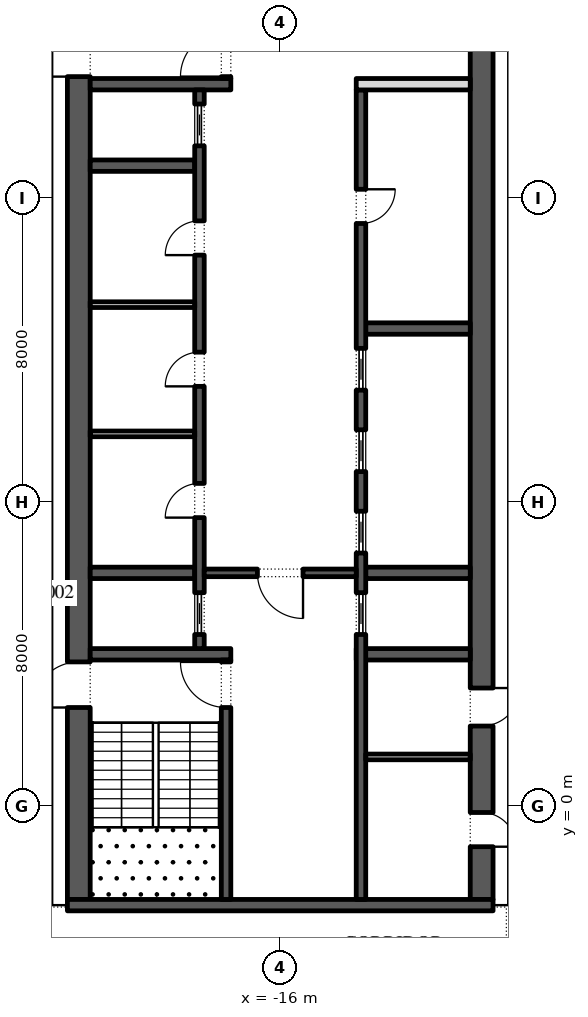
"""IFC4 building model, lengths in metres.
Left out: names, types, materials, properties, quantities, classifications, styles, units other than length and angle.
Written with IfcOpenShell. Run it as: python <this file> out.ifc"""

import sys

from ifc_helpers import new_model, si_unit, direction, frame, frame_2d, origin, place, context, subcontext, project, spatial, rectangle, extrude, element, fill, save


model = new_model("IFC4")
c1 = context("Model", 3, precision=1e-05, world=origin(), true_north=direction((0.0, 1.0)))
c2 = subcontext(c1, "Body", "Model", "MODEL_VIEW")
j1 = project(units=[si_unit("LENGTHUNIT", "METRE"), si_unit("PLANEANGLEUNIT", "RADIAN")], contexts=[c1])
p1 = place(None, origin())
s1 = spatial("IfcSite", under=j1, at=p1, CompositionType="ELEMENT")
p2 = place(p1, origin())
s2 = spatial("IfcBuilding", under=s1, at=p2, CompositionType="ELEMENT")
p3 = place(p2, frame((0.0, 0.0, 251.4)))
s3 = spatial("IfcBuildingStorey", under=s2, at=p3, CompositionType="ELEMENT", Elevation=251.4)
p4 = place(p3, frame((-21.359, 48.678, 0.0), z_axis=(0.0, 0.0, 1.0), x_axis=(-0.224949198343, -0.974370493275, 0.0)))
e1 = element("IfcWall", 1, at=p4, inside=s3, PredefinedType="STANDARD", context=c2, shape_type="SweptSolid", body=[
    extrude(rectangle(XDim=49.5, YDim=0.3, at=frame_2d((24.75, 0.0))), origin(), (0.0, 0.0, 1.0), 4.0),
])
p5 = place(p4, frame((1.157, 0.0, 0.45)))
e2 = element("IfcOpeningElement", 2, at=p5, cuts=e1, PredefinedType="OPENING", context=c2, shape_type="SweptSolid", body=[
    extrude(rectangle(XDim=4.5, YDim=3.05, at=frame_2d((2.25, 1.525))), frame((0.0, 0.16, 0.0), z_axis=(0.0, -1.0, 0.0), x_axis=(1.0, 0.0, 0.0)), (0.0, 0.0, 1.0), 0.32),
])
p6 = place(p4, frame((9.171, 0.0, 0.0)))
e3 = element("IfcOpeningElement", 3, at=p6, cuts=e1, PredefinedType="OPENING", context=c2, shape_type="SweptSolid", body=[
    extrude(rectangle(XDim=2.4, YDim=3.5, at=frame_2d((1.2, 1.75))), frame((0.0, 0.16, 0.0), z_axis=(0.0, -1.0, 0.0), x_axis=(1.0, 0.0, 0.0)), (0.0, 0.0, 1.0), 0.32),
])
p7 = place(p4, frame((15.236, 0.0, 0.45)))
e4 = element("IfcOpeningElement", 4, at=p7, cuts=e1, PredefinedType="OPENING", context=c2, shape_type="SweptSolid", body=[
    extrude(rectangle(XDim=4.5, YDim=3.05, at=frame_2d((2.25, 1.525))), frame((0.0, 0.16, 0.0), z_axis=(0.0, -1.0, 0.0), x_axis=(1.0, 0.0, 0.0)), (0.0, 0.0, 1.0), 0.32),
])
p8 = place(p4, frame((22.35, 0.0, 0.45)))
e5 = element("IfcOpeningElement", 5, at=p8, cuts=e1, PredefinedType="OPENING", context=c2, shape_type="SweptSolid", body=[
    extrude(rectangle(XDim=4.5, YDim=3.05, at=frame_2d((2.25, 1.525))), frame((0.0, 0.16, 0.0), z_axis=(0.0, -1.0, 0.0), x_axis=(1.0, 0.0, 0.0)), (0.0, 0.0, 1.0), 0.32),
])
p9 = place(p4, frame((29.464, 0.0, 0.45)))
e6 = element("IfcOpeningElement", 6, at=p9, cuts=e1, PredefinedType="OPENING", context=c2, shape_type="SweptSolid", body=[
    extrude(rectangle(XDim=4.5, YDim=3.05, at=frame_2d((2.25, 1.525))), frame((0.0, 0.16, 0.0), z_axis=(0.0, -1.0, 0.0), x_axis=(1.0, 0.0, 0.0)), (0.0, 0.0, 1.0), 0.32),
])
p10 = place(p4, frame((37.628, 0.0, 0.0)))
e7 = element("IfcOpeningElement", 7, at=p10, cuts=e1, PredefinedType="OPENING", context=c2, shape_type="SweptSolid", body=[
    extrude(rectangle(XDim=2.4, YDim=3.325, at=frame_2d((1.2, 1.663))), frame((0.0, 0.16, 0.0), z_axis=(0.0, -1.0, 0.0), x_axis=(1.0, 0.0, 0.0)), (0.0, 0.0, 1.0), 0.32),
])
p11 = place(p4, frame((43.693, 0.0, 0.45)))
e8 = element("IfcOpeningElement", 8, at=p11, cuts=e1, PredefinedType="OPENING", context=c2, shape_type="SweptSolid", body=[
    extrude(rectangle(XDim=4.5, YDim=2.825, at=frame_2d((2.25, 1.413))), frame((0.0, 0.16, 0.0), z_axis=(0.0, -1.0, 0.0), x_axis=(1.0, 0.0, 0.0)), (0.0, 0.0, 1.0), 0.32),
])
p12 = place(p3, frame((-21.3, -2.45, 0.0), z_axis=(0.0, 0.0, 1.0), x_axis=(0.0, 1.0, 0.0)))
e9 = element("IfcWall", 9, at=p12, inside=s3, PredefinedType="SHEAR", context=c2, shape_type="SweptSolid", body=[
    extrude(rectangle(XDim=27.9, YDim=0.6, at=frame_2d((13.95, 0.0))), origin(), (0.0, 0.0, 1.0), 4.0),
])
p13 = place(p12, frame((5.05, 0.0, 0.0)))
e10 = element("IfcOpeningElement", 10, at=p13, cuts=e9, PredefinedType="OPENING", context=c2, shape_type="SweptSolid", body=[
    extrude(rectangle(XDim=1.2, YDim=2.1, at=frame_2d((0.6, 1.05))), frame((0.0, 0.31, 0.0), z_axis=(0.0, -1.0, 0.0), x_axis=(1.0, 0.0, 0.0)), (0.0, 0.0, 1.0), 0.62),
])
p14 = place(p12, frame((21.65, 0.0, 0.0)))
e11 = element("IfcOpeningElement", 11, at=p14, cuts=e9, PredefinedType="OPENING", context=c2, shape_type="SweptSolid", body=[
    extrude(rectangle(XDim=1.2, YDim=2.1, at=frame_2d((0.6, 1.05))), frame((0.0, 0.31, 0.0), z_axis=(0.0, -1.0, 0.0), x_axis=(1.0, 0.0, 0.0)), (0.0, 0.0, 1.0), 0.62),
])
p15 = place(p3, frame((-10.7, -2.45, 0.0), z_axis=(0.0, 0.0, 1.0), x_axis=(0.0, 1.0, 0.0)))
e12 = element("IfcWall", 12, at=p15, inside=s3, PredefinedType="SHEAR", context=c2, shape_type="SweptSolid", body=[
    extrude(rectangle(XDim=27.9, YDim=0.6, at=frame_2d((13.95, 0.0))), origin(), (0.0, 0.0, 1.0), 4.0),
])
p16 = place(p15, frame((23.65, 0.0, 0.0)))
e13 = element("IfcOpeningElement", 13, at=p16, cuts=e12, PredefinedType="OPENING", context=c2, shape_type="SweptSolid", body=[
    extrude(rectangle(XDim=2.4, YDim=2.1, at=frame_2d((1.2, 1.05))), frame((0.0, 0.31, 0.0), z_axis=(0.0, -1.0, 0.0), x_axis=(1.0, 0.0, 0.0)), (0.0, 0.0, 1.0), 0.62),
])
p17 = place(p15, frame((1.387, 0.0, 0.0)))
e14 = element("IfcOpeningElement", 14, at=p17, cuts=e12, PredefinedType="OPENING", context=c2, shape_type="SweptSolid", body=[
    extrude(rectangle(XDim=0.9, YDim=2.1, at=frame_2d((0.45, 1.05))), frame((0.0, 0.31, 0.0), z_axis=(0.0, -1.0, 0.0), x_axis=(1.0, 0.0, 0.0)), (0.0, 0.0, 1.0), 0.62),
])
p18 = place(p15, frame((4.562, 0.0, 0.0)))
e15 = element("IfcOpeningElement", 15, at=p18, cuts=e12, PredefinedType="OPENING", context=c2, shape_type="SweptSolid", body=[
    extrude(rectangle(XDim=1.0, YDim=2.1, at=frame_2d((0.5, 1.05))), frame((0.0, 0.31, 0.0), z_axis=(0.0, -1.0, 0.0), x_axis=(1.0, 0.0, 0.0)), (0.0, 0.0, 1.0), 0.62),
])
p19 = place(p3, frame((-21.6, -2.6, 0.0), z_axis=(0.0, 0.0, 1.0), x_axis=(1.0, 0.0, 0.0)))
e16 = element("IfcWall", 16, at=p19, inside=s3, PredefinedType="SHEAR", context=c2, shape_type="SweptSolid", body=[
    extrude(rectangle(XDim=11.2, YDim=0.3, at=frame_2d((5.6, 0.0))), origin(), (0.0, 0.0, 1.0), 4.0),
])
p20 = place(p3, frame((-21.0, 4.0, 0.0), z_axis=(0.0, 0.0, 1.0), x_axis=(1.0, 0.0, 0.0)))
e17 = element("IfcWall", 17, at=p20, inside=s3, PredefinedType="SHEAR", context=c2, shape_type="SweptSolid", body=[
    extrude(rectangle(XDim=3.7, YDim=0.3, at=frame_2d((1.85, 0.0))), origin(), (0.0, 0.0, 1.0), 4.0),
])
p21 = place(p3, frame((-17.425, -2.45, 0.0), z_axis=(0.0, 0.0, 1.0), x_axis=(0.0, 1.0, 0.0)))
e18 = element("IfcWall", 18, at=p21, inside=s3, PredefinedType="SHEAR", context=c2, shape_type="SweptSolid", body=[
    extrude(rectangle(XDim=6.3, YDim=0.25, at=frame_2d((3.15, 0.0))), origin(), (0.0, 0.0, 1.0), 4.0),
])
p22 = place(p21, frame((5.05, 0.0, 0.0)))
e19 = element("IfcOpeningElement", 19, at=p22, cuts=e18, PredefinedType="OPENING", context=c2, shape_type="SweptSolid", body=[
    extrude(rectangle(XDim=1.2, YDim=2.1, at=frame_2d((0.6, 1.05))), frame((0.0, 0.135, 0.0), z_axis=(0.0, -1.0, 0.0), x_axis=(1.0, 0.0, 0.0)), (0.0, 0.0, 1.0), 0.27),
])
p23 = place(p3, frame((-21.0, 19.0, 0.0), z_axis=(0.0, 0.0, 1.0), x_axis=(1.0, 0.0, 0.0)))
e20 = element("IfcWall", 20, at=p23, inside=s3, PredefinedType="SHEAR", context=c2, shape_type="SweptSolid", body=[
    extrude(rectangle(XDim=3.7, YDim=0.3, at=frame_2d((1.85, 0.0))), origin(), (0.0, 0.0, 1.0), 4.0),
])
p24 = place(p3, frame((-17.425, 19.15, 0.0), z_axis=(0.0, 0.0, 1.0), x_axis=(0.0, 1.0, 0.0)))
e21 = element("IfcWall", 21, at=p24, inside=s3, PredefinedType="SHEAR", context=c2, shape_type="SweptSolid", body=[
    extrude(rectangle(XDim=6.3, YDim=0.25, at=frame_2d((3.15, 0.0))), origin(), (0.0, 0.0, 1.0), 4.0),
])
p25 = place(p24, frame((0.05, 0.0, 0.0)))
e22 = element("IfcOpeningElement", 22, at=p25, cuts=e21, PredefinedType="OPENING", context=c2, shape_type="SweptSolid", body=[
    extrude(rectangle(XDim=1.2, YDim=2.1, at=frame_2d((0.6, 1.05))), frame((0.0, 0.135, 0.0), z_axis=(0.0, -1.0, 0.0), x_axis=(1.0, 0.0, 0.0)), (0.0, 0.0, 1.0), 0.27),
])
for number, where, z_axis, x_axis in (
    (23, (-21.0, 6.143, 0.0), (0.0, 0.0, 1.0), (1.0, 0.0, 0.0)),
    (24, (-21.0, 16.857, 0.0), (0.0, 0.0, 1.0), (1.0, 0.0, 0.0)),
):
    element("IfcWall", number, at=place(p3, frame(where, z_axis=z_axis, x_axis=x_axis)), inside=s3, PredefinedType="SHEAR", context=c2, shape_type="SweptSolid", body=[
        extrude(rectangle(XDim=2.75, YDim=0.3, at=frame_2d((1.375, 0.0))), origin(), (0.0, 0.0, 1.0), 4.0),
    ])
p26 = place(p3, frame((-18.125, 4.15, 0.0), z_axis=(0.0, 0.0, 1.0), x_axis=(0.0, 1.0, 0.0)))
e25 = element("IfcWall", 25, at=p26, inside=s3, PredefinedType="SHEAR", context=c2, shape_type="SweptSolid", body=[
    extrude(rectangle(XDim=14.7, YDim=0.25, at=frame_2d((7.35, 0.0))), origin(), (0.0, 0.0, 1.0), 4.0),
])
p27 = place(p26, frame((3.446, 0.0, 0.0)))
e26 = element("IfcOpeningElement", 26, at=p27, cuts=e25, PredefinedType="OPENING", context=c2, shape_type="SweptSolid", body=[
    extrude(rectangle(XDim=0.9, YDim=2.1, at=frame_2d((0.45, 1.05))), frame((0.0, 0.135, 0.0), z_axis=(0.0, -1.0, 0.0), x_axis=(1.0, 0.0, 0.0)), (0.0, 0.0, 1.0), 0.27),
])
p28 = place(p26, frame((6.9, 0.0, 0.0)))
e27 = element("IfcOpeningElement", 27, at=p28, cuts=e25, PredefinedType="OPENING", context=c2, shape_type="SweptSolid", body=[
    extrude(rectangle(XDim=0.9, YDim=2.1, at=frame_2d((0.45, 1.05))), frame((0.0, 0.135, 0.0), z_axis=(0.0, -1.0, 0.0), x_axis=(1.0, 0.0, 0.0)), (0.0, 0.0, 1.0), 0.27),
])
p29 = place(p26, frame((10.354, 0.0, 0.0)))
e28 = element("IfcOpeningElement", 28, at=p29, cuts=e25, PredefinedType="OPENING", context=c2, shape_type="SweptSolid", body=[
    extrude(rectangle(XDim=0.9, YDim=2.1, at=frame_2d((0.45, 1.05))), frame((0.0, 0.135, 0.0), z_axis=(0.0, -1.0, 0.0), x_axis=(1.0, 0.0, 0.0)), (0.0, 0.0, 1.0), 0.27),
])
p30 = place(p26, frame((0.371, 0.0, 0.0)))
e29 = element("IfcOpeningElement", 29, at=p30, cuts=e25, PredefinedType="OPENING", context=c2, shape_type="SweptSolid", body=[
    extrude(rectangle(XDim=1.1, YDim=2.1, at=frame_2d((0.55, 1.05))), frame((0.0, 0.135, 0.0), z_axis=(0.0, -1.0, 0.0), x_axis=(1.0, 0.0, 0.0)), (0.0, 0.0, 1.0), 0.27),
])
p31 = place(p26, frame((13.229, 0.0, 0.0)))
e30 = element("IfcOpeningElement", 30, at=p31, cuts=e25, PredefinedType="OPENING", context=c2, shape_type="SweptSolid", body=[
    extrude(rectangle(XDim=1.1, YDim=2.1, at=frame_2d((0.55, 1.05))), frame((0.0, 0.135, 0.0), z_axis=(0.0, -1.0, 0.0), x_axis=(1.0, 0.0, 0.0)), (0.0, 0.0, 1.0), 0.27),
])
for number, where, z_axis, x_axis in (
    (31, (-21.0, 9.8, 0.0), (0.0, 0.0, 1.0), (1.0, 0.0, 0.0)),
    (32, (-21.0, 13.2, 0.0), (0.0, 0.0, 1.0), (1.0, 0.0, 0.0)),
):
    element("IfcWall", number, at=place(p3, frame(where, z_axis=z_axis, x_axis=x_axis)), inside=s3, PredefinedType="PARTITIONING", context=c2, shape_type="SweptSolid", body=[
        extrude(rectangle(XDim=2.75, YDim=0.15, at=frame_2d((1.375, 0.0))), origin(), (0.0, 0.0, 1.0), 4.0),
    ])
p32 = place(p3, frame((-14.0, 4.0, 0.0), z_axis=(0.0, 0.0, 1.0), x_axis=(1.0, 0.0, 0.0)))
e33 = element("IfcWall", 33, at=p32, inside=s3, PredefinedType="SHEAR", context=c2, shape_type="SweptSolid", body=[
    extrude(rectangle(XDim=3.0, YDim=0.3, at=frame_2d((1.5, 0.0))), origin(), (0.0, 0.0, 1.0), 4.0),
])
for number, where, z_axis, x_axis in (
    (34, (-13.75, 6.143, 0.0), (0.0, 0.0, 1.0), (1.0, 0.0, 0.0)),
    (35, (-13.75, 12.571, 0.0), (0.0, 0.0, 1.0), (1.0, 0.0, 0.0)),
):
    element("IfcWall", number, at=place(p3, frame(where, z_axis=z_axis, x_axis=x_axis)), inside=s3, PredefinedType="SHEAR", context=c2, shape_type="SweptSolid", body=[
        extrude(rectangle(XDim=2.75, YDim=0.3, at=frame_2d((1.375, 0.0))), origin(), (0.0, 0.0, 1.0), 4.0),
    ])
p33 = place(p3, frame((-13.875, -2.45, 0.0), z_axis=(0.0, 0.0, 1.0), x_axis=(0.0, 1.0, 0.0)))
e36 = element("IfcWall", 36, at=p33, inside=s3, PredefinedType="SHEAR", context=c2, shape_type="SweptSolid", body=[
    extrude(rectangle(XDim=21.3, YDim=0.25, at=frame_2d((10.65, 0.0))), origin(), (0.0, 0.0, 1.0), 4.0),
])
p34 = place(p33, frame((17.786, 0.0, 0.0)))
e37 = element("IfcOpeningElement", 37, at=p34, cuts=e36, PredefinedType="OPENING", context=c2, shape_type="SweptSolid", body=[
    extrude(rectangle(XDim=0.9, YDim=2.1, at=frame_2d((0.45, 1.05))), frame((0.0, 0.135, 0.0), z_axis=(0.0, -1.0, 0.0), x_axis=(1.0, 0.0, 0.0)), (0.0, 0.0, 1.0), 0.27),
])
p35 = place(p33, frame((6.971, 0.0, 0.0)))
e38 = element("IfcOpeningElement", 38, at=p35, cuts=e36, PredefinedType="OPENING", context=c2, shape_type="SweptSolid", body=[
    extrude(rectangle(XDim=1.1, YDim=2.1, at=frame_2d((0.55, 1.05))), frame((0.0, 0.135, 0.0), z_axis=(0.0, -1.0, 0.0), x_axis=(1.0, 0.0, 0.0)), (0.0, 0.0, 1.0), 0.27),
])
p36 = place(p33, frame((9.114, 0.0, 0.0)))
e39 = element("IfcOpeningElement", 39, at=p36, cuts=e36, PredefinedType="OPENING", context=c2, shape_type="SweptSolid", body=[
    extrude(rectangle(XDim=1.1, YDim=2.1, at=frame_2d((0.55, 1.05))), frame((0.0, 0.135, 0.0), z_axis=(0.0, -1.0, 0.0), x_axis=(1.0, 0.0, 0.0)), (0.0, 0.0, 1.0), 0.27),
])
p37 = place(p33, frame((11.257, 0.0, 0.0)))
e40 = element("IfcOpeningElement", 40, at=p37, cuts=e36, PredefinedType="OPENING", context=c2, shape_type="SweptSolid", body=[
    extrude(rectangle(XDim=1.1, YDim=2.1, at=frame_2d((0.55, 1.05))), frame((0.0, 0.135, 0.0), z_axis=(0.0, -1.0, 0.0), x_axis=(1.0, 0.0, 0.0)), (0.0, 0.0, 1.0), 0.27),
])
p38 = place(p33, frame((13.4, 0.0, 0.0)))
e41 = element("IfcOpeningElement", 41, at=p38, cuts=e36, PredefinedType="OPENING", context=c2, shape_type="SweptSolid", body=[
    extrude(rectangle(XDim=1.1, YDim=2.1, at=frame_2d((0.55, 1.05))), frame((0.0, 0.135, 0.0), z_axis=(0.0, -1.0, 0.0), x_axis=(1.0, 0.0, 0.0)), (0.0, 0.0, 1.0), 0.27),
])
p39 = place(p3, frame((-14.0, 19.0, 0.0), z_axis=(0.0, 0.0, 1.0), x_axis=(1.0, 0.0, 0.0)))
e42 = element("IfcWall", 42, at=p39, inside=s3, PredefinedType="PARTITIONING", context=c2, shape_type="SweptSolid", body=[
    extrude(rectangle(XDim=3.0, YDim=0.3, at=frame_2d((1.5, 0.0))), origin(), (0.0, 0.0, 1.0), 4.0),
])
p40 = place(p3, frame((-18.0, 6.143, 0.0), z_axis=(0.0, 0.0, 1.0), x_axis=(1.0, 0.0, 0.0)))
e43 = element("IfcWall", 43, at=p40, inside=s3, PredefinedType="SHEAR", context=c2, shape_type="SweptSolid", body=[
    extrude(rectangle(XDim=4.0, YDim=0.2, at=frame_2d((2.0, 0.0))), origin(), (0.0, 0.0, 1.0), 4.0),
])
p41 = place(p40, frame((1.4, 0.0, 0.0)))
e44 = element("IfcOpeningElement", 44, at=p41, cuts=e43, PredefinedType="OPENING", context=c2, shape_type="SweptSolid", body=[
    extrude(rectangle(XDim=1.2, YDim=2.1, at=frame_2d((0.6, 1.05))), frame((0.0, 0.11, 0.0), z_axis=(0.0, -1.0, 0.0), x_axis=(1.0, 0.0, 0.0)), (0.0, 0.0, 1.0), 0.22),
])
p42 = place(p3, frame((-13.75, 1.3, 0.0), z_axis=(0.0, 0.0, 1.0), x_axis=(1.0, 0.0, 0.0)))
e45 = element("IfcWall", 45, at=p42, inside=s3, PredefinedType="PARTITIONING", context=c2, shape_type="SweptSolid", body=[
    extrude(rectangle(XDim=2.75, YDim=0.15, at=frame_2d((1.375, 0.0))), origin(), (0.0, 0.0, 1.0), 4.0),
])
p43 = place(p27, origin())
e46 = element("IfcDoor", 46, at=p43, inside=s3, OperationType="SINGLE_SWING_RIGHT", PredefinedType="DOOR", context=c2, shape_type="SweptSolid", body=[
    extrude(rectangle(XDim=0.9, YDim=2.1, at=frame_2d((0.45, 1.05))), frame((0.0, 0.125, 0.0), z_axis=(0.0, -1.0, 0.0), x_axis=(1.0, 0.0, 0.0)), (0.0, 0.0, 1.0), 0.05),
])
fill(e26, e46)
p44 = place(p28, origin())
e47 = element("IfcDoor", 47, at=p44, inside=s3, OperationType="SINGLE_SWING_RIGHT", PredefinedType="DOOR", context=c2, shape_type="SweptSolid", body=[
    extrude(rectangle(XDim=0.9, YDim=2.1, at=frame_2d((0.45, 1.05))), frame((0.0, 0.125, 0.0), z_axis=(0.0, -1.0, 0.0), x_axis=(1.0, 0.0, 0.0)), (0.0, 0.0, 1.0), 0.05),
])
fill(e27, e47)
p45 = place(p29, origin())
e48 = element("IfcDoor", 48, at=p45, inside=s3, OperationType="SINGLE_SWING_RIGHT", PredefinedType="DOOR", context=c2, shape_type="SweptSolid", body=[
    extrude(rectangle(XDim=0.9, YDim=2.1, at=frame_2d((0.45, 1.05))), frame((0.0, 0.125, 0.0), z_axis=(0.0, -1.0, 0.0), x_axis=(1.0, 0.0, 0.0)), (0.0, 0.0, 1.0), 0.05),
])
fill(e28, e48)
p46 = place(p30, origin())
e49 = element("IfcDoor", 49, at=p46, inside=s3, OperationType="SLIDING_TO_LEFT", PredefinedType="DOOR", context=c2, shape_type="SweptSolid", body=[
    extrude(rectangle(XDim=1.1, YDim=2.1, at=frame_2d((0.55, 1.05))), frame((0.0, 0.025, 0.0), z_axis=(0.0, -1.0, 0.0), x_axis=(1.0, 0.0, 0.0)), (0.0, 0.0, 1.0), 0.05),
])
fill(e29, e49)
p47 = place(p31, origin())
e50 = element("IfcDoor", 50, at=p47, inside=s3, OperationType="SLIDING_TO_LEFT", PredefinedType="DOOR", context=c2, shape_type="SweptSolid", body=[
    extrude(rectangle(XDim=1.1, YDim=2.1, at=frame_2d((0.55, 1.05))), frame((0.0, 0.025, 0.0), z_axis=(0.0, -1.0, 0.0), x_axis=(1.0, 0.0, 0.0)), (0.0, 0.0, 1.0), 0.05),
])
fill(e30, e50)
p48 = place(p34, frame((0.9, -0.2, 0.0), z_axis=(0.0, 0.0, 1.0), x_axis=(-1.0, 0.0, 0.0)))
e51 = element("IfcDoor", 51, at=p48, inside=s3, OperationType="SINGLE_SWING_RIGHT", PredefinedType="DOOR", context=c2, shape_type="SweptSolid", body=[
    extrude(rectangle(XDim=0.9, YDim=2.1, at=frame_2d((0.45, 1.05))), frame((0.0, -0.075, 0.0), z_axis=(0.0, -1.0, 0.0), x_axis=(1.0, 0.0, 0.0)), (0.0, 0.0, 1.0), 0.05),
])
fill(e37, e51)
p49 = place(p35, origin())
e52 = element("IfcDoor", 52, at=p49, inside=s3, OperationType="SLIDING_TO_LEFT", PredefinedType="DOOR", context=c2, shape_type="SweptSolid", body=[
    extrude(rectangle(XDim=1.1, YDim=2.1, at=frame_2d((0.55, 1.05))), frame((0.0, 0.025, 0.0), z_axis=(0.0, -1.0, 0.0), x_axis=(1.0, 0.0, 0.0)), (0.0, 0.0, 1.0), 0.05),
])
fill(e38, e52)
p50 = place(p36, origin())
e53 = element("IfcDoor", 53, at=p50, inside=s3, OperationType="SLIDING_TO_LEFT", PredefinedType="DOOR", context=c2, shape_type="SweptSolid", body=[
    extrude(rectangle(XDim=1.1, YDim=2.1, at=frame_2d((0.55, 1.05))), frame((0.0, 0.025, 0.0), z_axis=(0.0, -1.0, 0.0), x_axis=(1.0, 0.0, 0.0)), (0.0, 0.0, 1.0), 0.05),
])
fill(e39, e53)
p51 = place(p37, origin())
e54 = element("IfcDoor", 54, at=p51, inside=s3, OperationType="SLIDING_TO_LEFT", PredefinedType="DOOR", context=c2, shape_type="SweptSolid", body=[
    extrude(rectangle(XDim=1.1, YDim=2.1, at=frame_2d((0.55, 1.05))), frame((0.0, 0.025, 0.0), z_axis=(0.0, -1.0, 0.0), x_axis=(1.0, 0.0, 0.0)), (0.0, 0.0, 1.0), 0.05),
])
fill(e40, e54)
p52 = place(p38, origin())
e55 = element("IfcDoor", 55, at=p52, inside=s3, OperationType="SLIDING_TO_LEFT", PredefinedType="DOOR", context=c2, shape_type="SweptSolid", body=[
    extrude(rectangle(XDim=1.1, YDim=2.1, at=frame_2d((0.55, 1.05))), frame((0.0, 0.025, 0.0), z_axis=(0.0, -1.0, 0.0), x_axis=(1.0, 0.0, 0.0)), (0.0, 0.0, 1.0), 0.05),
])
fill(e41, e55)
p53 = place(p41, frame((1.2, 0.0, 0.0), z_axis=(0.0, 0.0, 1.0), x_axis=(-1.0, 0.0, 0.0)))
e56 = element("IfcDoor", 56, at=p53, inside=s3, OperationType="SINGLE_SWING_RIGHT", PredefinedType="DOOR", context=c2, shape_type="SweptSolid", body=[
    extrude(rectangle(XDim=1.2, YDim=2.1, at=frame_2d((0.6, 1.05))), frame((0.0, 0.025, 0.0), z_axis=(0.0, -1.0, 0.0), x_axis=(1.0, 0.0, 0.0)), (0.0, 0.0, 1.0), 0.05),
])
fill(e44, e56)
p54 = place(p22, origin())
e57 = element("IfcDoor", 57, at=p54, inside=s3, OperationType="SINGLE_SWING_LEFT", PredefinedType="DOOR", context=c2, shape_type="SweptSolid", body=[
    extrude(rectangle(XDim=1.2, YDim=2.1, at=frame_2d((0.6, 1.05))), frame((0.0, 0.025, 0.0), z_axis=(0.0, -1.0, 0.0), x_axis=(1.0, 0.0, 0.0)), (0.0, 0.0, 1.0), 0.05),
])
fill(e19, e57)
p55 = place(p13, origin())
e58 = element("IfcDoor", 58, at=p55, inside=s3, OperationType="SINGLE_SWING_RIGHT", PredefinedType="DOOR", context=c2, shape_type="SweptSolid", body=[
    extrude(rectangle(XDim=1.2, YDim=2.1, at=frame_2d((0.6, 1.05))), frame((0.0, 0.025, 0.0), z_axis=(0.0, -1.0, 0.0), x_axis=(1.0, 0.0, 0.0)), (0.0, 0.0, 1.0), 0.05),
])
fill(e10, e58)
p56 = place(p25, origin())
e59 = element("IfcDoor", 59, at=p56, inside=s3, OperationType="SINGLE_SWING_RIGHT", PredefinedType="DOOR", context=c2, shape_type="SweptSolid", body=[
    extrude(rectangle(XDim=1.2, YDim=2.1, at=frame_2d((0.6, 1.05))), frame((0.0, 0.025, 0.0), z_axis=(0.0, -1.0, 0.0), x_axis=(1.0, 0.0, 0.0)), (0.0, 0.0, 1.0), 0.05),
])
fill(e22, e59)
p57 = place(p14, origin())
e60 = element("IfcDoor", 60, at=p57, inside=s3, OperationType="SINGLE_SWING_RIGHT", PredefinedType="DOOR", context=c2, shape_type="SweptSolid", body=[
    extrude(rectangle(XDim=1.2, YDim=2.1, at=frame_2d((0.6, 1.05))), frame((0.0, 0.025, 0.0), z_axis=(0.0, -1.0, 0.0), x_axis=(1.0, 0.0, 0.0)), (0.0, 0.0, 1.0), 0.05),
])
fill(e11, e60)
p58 = place(p17, frame((0.9, 0.55, 0.0), z_axis=(0.0, 0.0, 1.0), x_axis=(-1.0, 0.0, 0.0)))
e61 = element("IfcDoor", 61, at=p58, inside=s3, OperationType="SINGLE_SWING_LEFT", PredefinedType="DOOR", context=c2, shape_type="SweptSolid", body=[
    extrude(rectangle(XDim=0.9, YDim=2.1, at=frame_2d((0.45, 1.05))), frame((0.0, 0.3, 0.0), z_axis=(0.0, -1.0, 0.0), x_axis=(1.0, 0.0, 0.0)), (0.0, 0.0, 1.0), 0.05),
])
fill(e14, e61)
p59 = place(p18, frame((1.0, 0.55, 0.0), z_axis=(0.0, 0.0, 1.0), x_axis=(-1.0, 0.0, 0.0)))
e62 = element("IfcDoor", 62, at=p59, inside=s3, OperationType="SINGLE_SWING_RIGHT", PredefinedType="DOOR", context=c2, shape_type="SweptSolid", body=[
    extrude(rectangle(XDim=1.0, YDim=2.1, at=frame_2d((0.5, 1.05))), frame((0.0, 0.3, 0.0), z_axis=(0.0, -1.0, 0.0), x_axis=(1.0, 0.0, 0.0)), (0.0, 0.0, 1.0), 0.05),
])
fill(e15, e62)
save(model, sys.argv[1])
